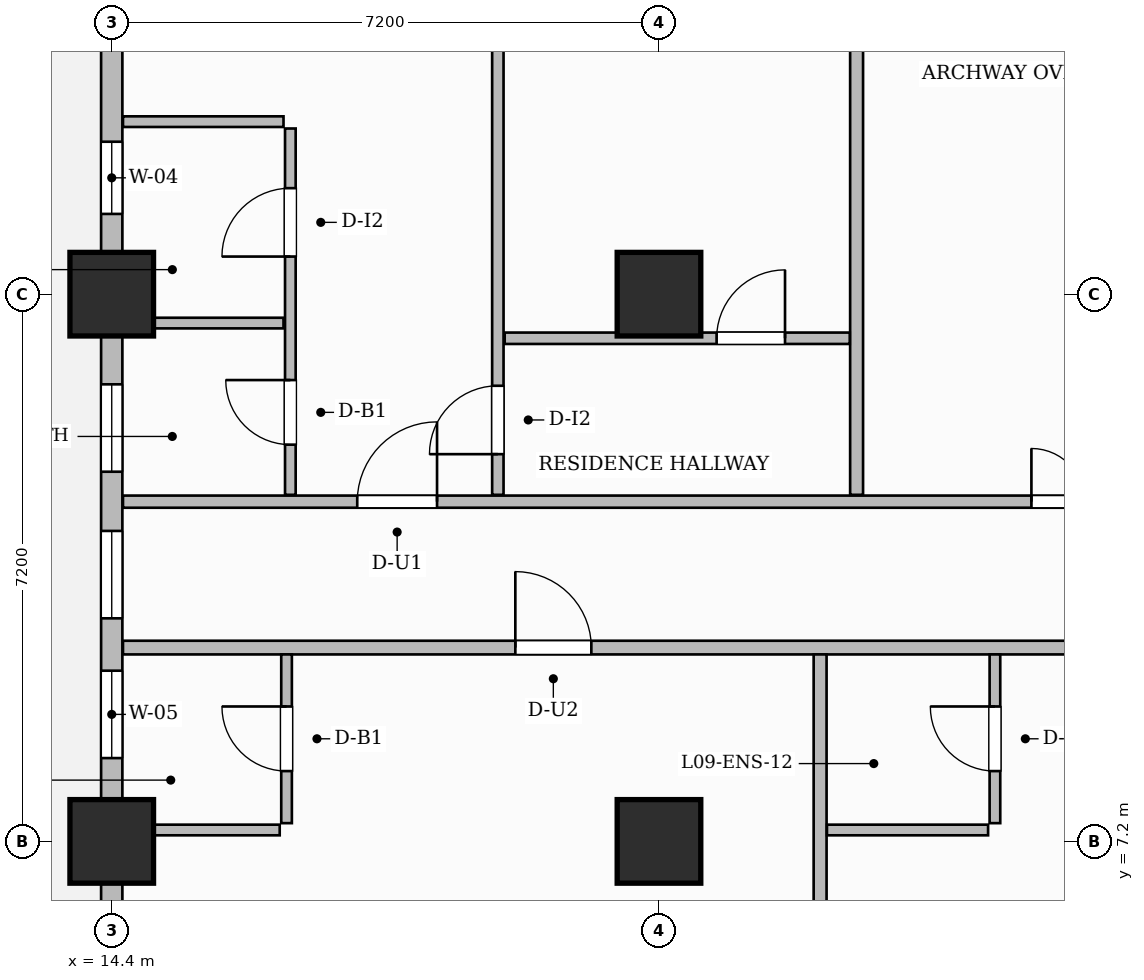
"""IFC4 building model, lengths in metres.
Left out: names, types, materials, properties, quantities, classifications, styles, units other than length and angle.
Written with IfcOpenShell. Run it as: python <this file> out.ifc"""

import sys

from ifc_helpers import new_model, si_unit, direction, frame, frame_2d, origin, origin_2d, place, context, subcontext, project, spatial, rectangle, extrude, source, transform, mapped, element, fill, save


model = new_model("IFC4")
c1 = context("Model", 3, precision=1e-05, world=origin(), true_north=direction((0.0, 1.0)))
c2 = subcontext(c1, "Body", "Model", "MODEL_VIEW")
j1 = project(units=[si_unit("LENGTHUNIT", "METRE"), si_unit("PLANEANGLEUNIT", "RADIAN")], contexts=[c1])
p1 = place(None, origin())
s1 = spatial("IfcSite", under=j1, at=p1, CompositionType="ELEMENT")
p2 = place(p1, origin())
s2 = spatial("IfcBuilding", under=s1, at=p2, CompositionType="ELEMENT")
p3 = place(p2, frame((0.0, 0.0, 43.5)))
s3 = spatial("IfcBuildingStorey", under=s2, at=p3, CompositionType="ELEMENT", Elevation=43.5)
m1 = source(origin(), c2, "Body", "SweptSolid", [
    extrude(rectangle(XDim=1.1, YDim=1.1, at=origin_2d()), origin(), (0.0, 0.0, 1.0), 3.7),
])
for number, where, z_axis, x_axis in (
    (1, (14.4, 7.2, 0.0), (0.0, 0.0, 1.0), (1.0, 0.0, 0.0)),
    (2, (14.4, 14.4, 0.0), (0.0, 0.0, 1.0), (1.0, 0.0, 0.0)),
    (3, (21.6, 7.2, 0.0), (0.0, 0.0, 1.0), (1.0, 0.0, 0.0)),
    (4, (21.6, 14.4, 0.0), (0.0, 0.0, 1.0), (1.0, 0.0, 0.0)),
):
    element("IfcColumn", number, at=place(p3, frame(where, z_axis=z_axis, x_axis=x_axis)), inside=s3, PredefinedType="COLUMN", context=c2, shape_type="MappedRepresentation", body=[
        mapped(m1, transform((0.0, 0.0, 0.0), scale=1.0)),
    ])
p4 = place(p3, frame((14.548, 9.75, 0.0), z_axis=(0.0, 0.0, 1.0), x_axis=(1.0, 0.0, 0.0)))
e5 = element("IfcWall", 5, at=p4, inside=s3, PredefinedType="PARTITIONING", context=c2, shape_type="SweptSolid", body=[
    extrude(rectangle(XDim=15.562, YDim=0.18, at=frame_2d((7.781, 0.0))), origin(), (0.0, 0.0, 1.0), 3.45),
])
p5 = place(p4, frame((5.162, 0.0, 0.0)))
e6 = element("IfcOpeningElement", 6, at=p5, cuts=e5, PredefinedType="OPENING", context=c2, shape_type="SweptSolid", body=[
    extrude(rectangle(XDim=1.0, YDim=2.2, at=frame_2d((0.5, 1.1))), frame((0.0, 0.1, 0.0), z_axis=(0.0, -1.0, 0.0), x_axis=(1.0, 0.0, 0.0)), (0.0, 0.0, 1.0), 0.2),
])
p6 = place(p4, frame((13.037, 0.0, 0.0)))
e7 = element("IfcOpeningElement", 7, at=p6, cuts=e5, PredefinedType="OPENING", context=c2, shape_type="SweptSolid", body=[
    extrude(rectangle(XDim=1.05, YDim=2.25, at=frame_2d((0.525, 1.125))), frame((0.0, 0.1, 0.0), z_axis=(0.0, -1.0, 0.0), x_axis=(1.0, 0.0, 0.0)), (0.0, 0.0, 1.0), 0.2),
])
p7 = place(p3, frame((14.548, 11.67, 0.0), z_axis=(0.0, 0.0, 1.0), x_axis=(1.0, 0.0, 0.0)))
e8 = element("IfcWall", 8, at=p7, inside=s3, PredefinedType="PARTITIONING", context=c2, shape_type="SweptSolid", body=[
    extrude(rectangle(XDim=15.562, YDim=0.16, at=frame_2d((7.781, 0.0))), origin(), (0.0, 0.0, 1.0), 3.45),
])
p8 = place(p7, frame((3.082, 0.0, 0.0)))
e9 = element("IfcOpeningElement", 9, at=p8, cuts=e8, PredefinedType="OPENING", context=c2, shape_type="SweptSolid", body=[
    extrude(rectangle(XDim=1.05, YDim=2.25, at=frame_2d((0.525, 1.125))), frame((0.0, 0.09, 0.0), z_axis=(0.0, -1.0, 0.0), x_axis=(1.0, 0.0, 0.0)), (0.0, 0.0, 1.0), 0.18),
])
p9 = place(p7, frame((11.952, 0.0, 0.0)))
e10 = element("IfcOpeningElement", 10, at=p9, cuts=e8, PredefinedType="OPENING", context=c2, shape_type="SweptSolid", body=[
    extrude(rectangle(XDim=1.4, YDim=2.35, at=frame_2d((0.7, 1.175))), frame((0.0, 0.09, 0.0), z_axis=(0.0, -1.0, 0.0), x_axis=(1.0, 0.0, 0.0)), (0.0, 0.0, 1.0), 0.18),
])
p10 = place(p3, frame((23.72, 0.148, 0.0), z_axis=(0.0, 0.0, 1.0), x_axis=(0.0, 1.0, 0.0)))
e11 = element("IfcWall", 11, at=p10, inside=s3, PredefinedType="PARTITIONING", context=c2, shape_type="SweptSolid", body=[
    extrude(rectangle(XDim=9.512, YDim=0.17, at=frame_2d((4.756, 0.0))), origin(), (0.0, 0.0, 1.0), 3.45),
])
p11 = place(p3, frame((16.7, 7.44, 0.0), z_axis=(0.0, 0.0, 1.0), x_axis=(0.0, 1.0, 0.0)))
e12 = element("IfcWall", 12, at=p11, inside=s3, PredefinedType="PARTITIONING", context=c2, shape_type="SweptSolid", body=[
    extrude(rectangle(XDim=2.22, YDim=0.14, at=frame_2d((1.11, 0.0))), origin(), (0.0, 0.0, 1.0), 3.45),
])
p12 = place(p11, frame((0.685, 0.0, 0.0)))
e13 = element("IfcOpeningElement", 13, at=p12, cuts=e12, PredefinedType="OPENING", context=c2, shape_type="SweptSolid", body=[
    extrude(rectangle(XDim=0.85, YDim=2.1, at=frame_2d((0.425, 1.05))), frame((0.0, 0.08, 0.0), z_axis=(0.0, -1.0, 0.0), x_axis=(1.0, 0.0, 0.0)), (0.0, 0.0, 1.0), 0.16),
])
p13 = place(p3, frame((14.49, 7.35, 0.0), z_axis=(0.0, 0.0, 1.0), x_axis=(1.0, 0.0, 0.0)))
e14 = element("IfcWall", 14, at=p13, inside=s3, PredefinedType="PARTITIONING", context=c2, shape_type="SweptSolid", body=[
    extrude(rectangle(XDim=2.12, YDim=0.14, at=frame_2d((1.06, 0.0))), origin(), (0.0, 0.0, 1.0), 2.885),
])
p14 = place(p3, frame((26.02, 7.44, 0.0), z_axis=(0.0, 0.0, 1.0), x_axis=(0.0, 1.0, 0.0)))
e15 = element("IfcWall", 15, at=p14, inside=s3, PredefinedType="PARTITIONING", context=c2, shape_type="SweptSolid", body=[
    extrude(rectangle(XDim=2.22, YDim=0.14, at=frame_2d((1.11, 0.0))), origin(), (0.0, 0.0, 1.0), 3.45),
])
p15 = place(p14, frame((0.685, 0.0, 0.0)))
e16 = element("IfcOpeningElement", 16, at=p15, cuts=e15, PredefinedType="OPENING", context=c2, shape_type="SweptSolid", body=[
    extrude(rectangle(XDim=0.85, YDim=2.1, at=frame_2d((0.425, 1.05))), frame((0.0, 0.08, 0.0), z_axis=(0.0, -1.0, 0.0), x_axis=(1.0, 0.0, 0.0)), (0.0, 0.0, 1.0), 0.16),
])
p16 = place(p3, frame((23.81, 7.35, 0.0), z_axis=(0.0, 0.0, 1.0), x_axis=(1.0, 0.0, 0.0)))
e17 = element("IfcWall", 17, at=p16, inside=s3, PredefinedType="PARTITIONING", context=c2, shape_type="SweptSolid", body=[
    extrude(rectangle(XDim=2.12, YDim=0.14, at=frame_2d((1.06, 0.0))), origin(), (0.0, 0.0, 1.0), 2.885),
])
p17 = place(p3, frame((24.2, 11.76, 0.0), z_axis=(0.0, 0.0, 1.0), x_axis=(0.0, 1.0, 0.0)))
e18 = element("IfcWall", 18, at=p17, inside=s3, PredefinedType="PARTITIONING", context=c2, shape_type="SweptSolid", body=[
    extrude(rectangle(XDim=9.692, YDim=0.17, at=frame_2d((4.846, 0.0))), origin(), (0.0, 0.0, 1.0), 3.45),
])
p18 = place(p3, frame((16.75, 11.76, 0.0), z_axis=(0.0, 0.0, 1.0), x_axis=(0.0, 1.0, 0.0)))
e19 = element("IfcWall", 19, at=p18, inside=s3, PredefinedType="PARTITIONING", context=c2, shape_type="SweptSolid", body=[
    extrude(rectangle(XDim=4.82, YDim=0.14, at=frame_2d((2.41, 0.0))), origin(), (0.0, 0.0, 1.0), 3.45),
])
p19 = place(p18, frame((0.66, 0.0, 0.0)))
e20 = element("IfcOpeningElement", 20, at=p19, cuts=e19, PredefinedType="OPENING", context=c2, shape_type="SweptSolid", body=[
    extrude(rectangle(XDim=0.85, YDim=2.1, at=frame_2d((0.425, 1.05))), frame((0.0, 0.08, 0.0), z_axis=(0.0, -1.0, 0.0), x_axis=(1.0, 0.0, 0.0)), (0.0, 0.0, 1.0), 0.16),
])
p20 = place(p18, frame((3.135, 0.0, 0.0)))
e21 = element("IfcOpeningElement", 21, at=p20, cuts=e19, PredefinedType="OPENING", context=c2, shape_type="SweptSolid", body=[
    extrude(rectangle(XDim=0.9, YDim=2.15, at=frame_2d((0.45, 1.075))), frame((0.0, 0.08, 0.0), z_axis=(0.0, -1.0, 0.0), x_axis=(1.0, 0.0, 0.0)), (0.0, 0.0, 1.0), 0.16),
])
p21 = place(p3, frame((14.59, 14.02, 0.0), z_axis=(0.0, 0.0, 1.0), x_axis=(1.0, 0.0, 0.0)))
e22 = element("IfcWall", 22, at=p21, inside=s3, PredefinedType="PARTITIONING", context=c2, shape_type="SweptSolid", body=[
    extrude(rectangle(XDim=2.07, YDim=0.14, at=frame_2d((1.035, 0.0))), origin(), (0.0, 0.0, 1.0), 3.45),
])
p22 = place(p3, frame((14.548, 16.67, 0.0), z_axis=(0.0, 0.0, 1.0), x_axis=(1.0, 0.0, 0.0)))
e23 = element("IfcWall", 23, at=p22, inside=s3, PredefinedType="PARTITIONING", context=c2, shape_type="SweptSolid", body=[
    extrude(rectangle(XDim=2.112, YDim=0.14, at=frame_2d((1.056, 0.0))), origin(), (0.0, 0.0, 1.0), 3.45),
])
p23 = place(p3, frame((19.48, 11.76, 0.0), z_axis=(0.0, 0.0, 1.0), x_axis=(0.0, 1.0, 0.0)))
e24 = element("IfcWall", 24, at=p23, inside=s3, PredefinedType="PARTITIONING", context=c2, shape_type="SweptSolid", body=[
    extrude(rectangle(XDim=9.692, YDim=0.15, at=frame_2d((4.846, 0.0))), origin(), (0.0, 0.0, 1.0), 3.45),
])
p24 = place(p23, frame((0.535, 0.0, 0.0)))
e25 = element("IfcOpeningElement", 25, at=p24, cuts=e24, PredefinedType="OPENING", context=c2, shape_type="SweptSolid", body=[
    extrude(rectangle(XDim=0.9, YDim=2.15, at=frame_2d((0.45, 1.075))), frame((0.0, 0.085, 0.0), z_axis=(0.0, -1.0, 0.0), x_axis=(1.0, 0.0, 0.0)), (0.0, 0.0, 1.0), 0.17),
])
p25 = place(p3, frame((19.57, 13.82, 0.0), z_axis=(0.0, 0.0, 1.0), x_axis=(1.0, 0.0, 0.0)))
e26 = element("IfcWall", 26, at=p25, inside=s3, PredefinedType="PARTITIONING", context=c2, shape_type="SweptSolid", body=[
    extrude(rectangle(XDim=4.54, YDim=0.15, at=frame_2d((2.27, 0.0))), origin(), (0.0, 0.0, 1.0), 3.45),
])
p26 = place(p25, frame((2.788, 0.0, 0.0)))
e27 = element("IfcOpeningElement", 27, at=p26, cuts=e26, PredefinedType="OPENING", context=c2, shape_type="SweptSolid", body=[
    extrude(rectangle(XDim=0.9, YDim=2.15, at=frame_2d((0.45, 1.075))), frame((0.0, 0.085, 0.0), z_axis=(0.0, -1.0, 0.0), x_axis=(1.0, 0.0, 0.0)), (0.0, 0.0, 1.0), 0.17),
])
p27 = place(p3, frame((14.4, 0.05, 0.0), z_axis=(0.0, 0.0, 1.0), x_axis=(0.0, 1.0, 0.0)))
e28 = element("IfcWall", 28, at=p27, inside=s3, PredefinedType="SOLIDWALL", context=c2, shape_type="SweptSolid", body=[
    extrude(rectangle(XDim=21.5, YDim=0.28, at=frame_2d((10.75, 0.0))), origin(), (0.0, 0.0, 1.0), 2.885),
])
p28 = place(p27, frame((1.275, 0.0, 0.8)))
e29 = element("IfcOpeningElement", 29, at=p28, cuts=e28, PredefinedType="OPENING", context=c2, shape_type="SweptSolid", body=[
    extrude(rectangle(XDim=1.8, YDim=1.85, at=frame_2d((0.9, 0.925))), frame((0.0, 0.15, 0.0), z_axis=(0.0, -1.0, 0.0), x_axis=(1.0, 0.0, 0.0)), (0.0, 0.0, 1.0), 0.3),
])
p29 = place(p27, frame((4.025, 0.0, 0.8)))
e30 = element("IfcOpeningElement", 30, at=p29, cuts=e28, PredefinedType="OPENING", context=c2, shape_type="SweptSolid", body=[
    extrude(rectangle(XDim=1.8, YDim=1.85, at=frame_2d((0.9, 0.925))), frame((0.0, 0.15, 0.0), z_axis=(0.0, -1.0, 0.0), x_axis=(1.0, 0.0, 0.0)), (0.0, 0.0, 1.0), 0.3),
])
p30 = place(p27, frame((8.246, 0.0, 0.8)))
e31 = element("IfcOpeningElement", 31, at=p30, cuts=e28, PredefinedType="OPENING", context=c2, shape_type="SweptSolid", body=[
    extrude(rectangle(XDim=1.15, YDim=1.8, at=frame_2d((0.575, 0.9))), frame((0.0, 0.15, 0.0), z_axis=(0.0, -1.0, 0.0), x_axis=(1.0, 0.0, 0.0)), (0.0, 0.0, 1.0), 0.3),
])
p31 = place(p27, frame((10.085, 0.0, 0.8)))
e32 = element("IfcOpeningElement", 32, at=p31, cuts=e28, PredefinedType="OPENING", context=c2, shape_type="SweptSolid", body=[
    extrude(rectangle(XDim=1.15, YDim=1.8, at=frame_2d((0.575, 0.9))), frame((0.0, 0.15, 0.0), z_axis=(0.0, -1.0, 0.0), x_axis=(1.0, 0.0, 0.0)), (0.0, 0.0, 1.0), 0.3),
])
p32 = place(p27, frame((12.014, 0.0, 0.8)))
e33 = element("IfcOpeningElement", 33, at=p32, cuts=e28, PredefinedType="OPENING", context=c2, shape_type="SweptSolid", body=[
    extrude(rectangle(XDim=1.15, YDim=1.8, at=frame_2d((0.575, 0.9))), frame((0.0, 0.15, 0.0), z_axis=(0.0, -1.0, 0.0), x_axis=(1.0, 0.0, 0.0)), (0.0, 0.0, 1.0), 0.3),
])
p33 = place(p27, frame((15.406, 0.0, 0.8)))
e34 = element("IfcOpeningElement", 34, at=p33, cuts=e28, PredefinedType="OPENING", context=c2, shape_type="SweptSolid", body=[
    extrude(rectangle(XDim=0.95, YDim=1.75, at=frame_2d((0.475, 0.875))), frame((0.0, 0.15, 0.0), z_axis=(0.0, -1.0, 0.0), x_axis=(1.0, 0.0, 0.0)), (0.0, 0.0, 1.0), 0.3),
])
p34 = place(p27, frame((17.789, 0.0, 0.8)))
e35 = element("IfcOpeningElement", 35, at=p34, cuts=e28, PredefinedType="OPENING", context=c2, shape_type="SweptSolid", body=[
    extrude(rectangle(XDim=1.8, YDim=1.85, at=frame_2d((0.9, 0.925))), frame((0.0, 0.15, 0.0), z_axis=(0.0, -1.0, 0.0), x_axis=(1.0, 0.0, 0.0)), (0.0, 0.0, 1.0), 0.3),
])
m2 = source(origin(), c2, "Body", "SweptSolid", [
    extrude(rectangle(XDim=0.85, YDim=2.1, at=frame_2d((0.425, 1.05))), frame((0.0, 0.025, 0.0), z_axis=(0.0, -1.0, 0.0), x_axis=(1.0, 0.0, 0.0)), (0.0, 0.0, 1.0), 0.05),
])
p35 = place(p12, origin())
e36 = element("IfcDoor", 36, at=p35, inside=s3, OperationType="SINGLE_SWING_RIGHT", PredefinedType="DOOR", context=c2, shape_type="MappedRepresentation", body=[
    mapped(m2, transform((0.0, 0.0, 0.0), scale=1.0)),
])
fill(e13, e36)
m3 = source(origin(), c2, "Body", "SweptSolid", [
    extrude(rectangle(XDim=1.0, YDim=2.2, at=frame_2d((0.5, 1.1))), frame((0.0, 0.025, 0.0), z_axis=(0.0, -1.0, 0.0), x_axis=(1.0, 0.0, 0.0)), (0.0, 0.0, 1.0), 0.05),
])
p36 = place(p5, origin())
e37 = element("IfcDoor", 37, at=p36, inside=s3, OperationType="SINGLE_SWING_LEFT", PredefinedType="DOOR", context=c2, shape_type="MappedRepresentation", body=[
    mapped(m3, transform((0.0, 0.0, 0.0), scale=1.0)),
])
fill(e6, e37)
p37 = place(p15, origin())
e38 = element("IfcDoor", 38, at=p37, inside=s3, OperationType="SINGLE_SWING_RIGHT", PredefinedType="DOOR", context=c2, shape_type="MappedRepresentation", body=[
    mapped(m2, transform((0.0, 0.0, 0.0), scale=1.0)),
])
fill(e16, e38)
p38 = place(p19, origin())
e39 = element("IfcDoor", 39, at=p38, inside=s3, OperationType="SINGLE_SWING_RIGHT", PredefinedType="DOOR", context=c2, shape_type="MappedRepresentation", body=[
    mapped(m2, transform((0.0, 0.0, 0.0), scale=1.0)),
])
fill(e20, e39)
m4 = source(origin(), c2, "Body", "SweptSolid", [
    extrude(rectangle(XDim=0.9, YDim=2.15, at=frame_2d((0.45, 1.075))), frame((0.0, 0.025, 0.0), z_axis=(0.0, -1.0, 0.0), x_axis=(1.0, 0.0, 0.0)), (0.0, 0.0, 1.0), 0.05),
])
p39 = place(p20, origin())
e40 = element("IfcDoor", 40, at=p39, inside=s3, OperationType="SINGLE_SWING_LEFT", PredefinedType="DOOR", context=c2, shape_type="MappedRepresentation", body=[
    mapped(m4, transform((0.0, 0.0, 0.0), scale=1.0)),
])
fill(e21, e40)
m5 = source(origin(), c2, "Body", "SweptSolid", [
    extrude(rectangle(XDim=1.05, YDim=2.25, at=frame_2d((0.525, 1.125))), frame((0.0, 0.025, 0.0), z_axis=(0.0, -1.0, 0.0), x_axis=(1.0, 0.0, 0.0)), (0.0, 0.0, 1.0), 0.05),
])
p40 = place(p8, origin())
e41 = element("IfcDoor", 41, at=p40, inside=s3, OperationType="SINGLE_SWING_RIGHT", PredefinedType="DOOR", context=c2, shape_type="MappedRepresentation", body=[
    mapped(m5, transform((0.0, 0.0, 0.0), scale=1.0)),
])
fill(e9, e41)
p41 = place(p24, origin())
e42 = element("IfcDoor", 42, at=p41, inside=s3, OperationType="SINGLE_SWING_LEFT", PredefinedType="DOOR", context=c2, shape_type="MappedRepresentation", body=[
    mapped(m4, transform((0.0, 0.0, 0.0), scale=1.0)),
])
fill(e25, e42)
p42 = place(p26, origin())
e43 = element("IfcDoor", 43, at=p42, inside=s3, OperationType="SINGLE_SWING_RIGHT", PredefinedType="DOOR", context=c2, shape_type="MappedRepresentation", body=[
    mapped(m4, transform((0.0, 0.0, 0.0), scale=1.0)),
])
fill(e27, e43)
m6 = source(origin(), c2, "Body", "SweptSolid", [
    extrude(rectangle(XDim=1.4, YDim=2.35, at=frame_2d((0.7, 1.175))), frame((0.0, 0.025, 0.0), z_axis=(0.0, -1.0, 0.0), x_axis=(1.0, 0.0, 0.0)), (0.0, 0.0, 1.0), 0.05),
])
p43 = place(p9, origin())
e44 = element("IfcDoor", 44, at=p43, inside=s3, OperationType="DOUBLE_DOOR_SINGLE_SWING", PredefinedType="DOOR", context=c2, shape_type="MappedRepresentation", body=[
    mapped(m6, transform((0.0, 0.0, 0.0), scale=1.0)),
])
fill(e10, e44)
m7 = source(origin(), c2, "Body", "SweptSolid", [
    extrude(rectangle(XDim=1.15, YDim=1.8, at=frame_2d((0.575, 0.9))), frame((0.0, 0.03, 0.0), z_axis=(0.0, -1.0, 0.0), x_axis=(1.0, 0.0, 0.0)), (0.0, 0.0, 1.0), 0.06),
])
p44 = place(p30, origin())
e45 = element("IfcWindow", 45, at=p44, inside=s3, PartitioningType="SINGLE_PANEL", PredefinedType="WINDOW", context=c2, shape_type="MappedRepresentation", body=[
    mapped(m7, transform((0.0, 0.0, 0.0), scale=1.0)),
])
fill(e31, e45)
p45 = place(p31, origin())
e46 = element("IfcWindow", 46, at=p45, inside=s3, PartitioningType="SINGLE_PANEL", PredefinedType="WINDOW", context=c2, shape_type="MappedRepresentation", body=[
    mapped(m7, transform((0.0, 0.0, 0.0), scale=1.0)),
])
fill(e32, e46)
p46 = place(p32, origin())
e47 = element("IfcWindow", 47, at=p46, inside=s3, PartitioningType="SINGLE_PANEL", PredefinedType="WINDOW", context=c2, shape_type="MappedRepresentation", body=[
    mapped(m7, transform((0.0, 0.0, 0.0), scale=1.0)),
])
fill(e33, e47)
m8 = source(origin(), c2, "Body", "SweptSolid", [
    extrude(rectangle(XDim=0.95, YDim=1.75, at=frame_2d((0.475, 0.875))), frame((0.0, 0.03, 0.0), z_axis=(0.0, -1.0, 0.0), x_axis=(1.0, 0.0, 0.0)), (0.0, 0.0, 1.0), 0.06),
])
p47 = place(p33, origin())
e48 = element("IfcWindow", 48, at=p47, inside=s3, PartitioningType="SINGLE_PANEL", PredefinedType="WINDOW", context=c2, shape_type="MappedRepresentation", body=[
    mapped(m8, transform((0.0, 0.0, 0.0), scale=1.0)),
])
fill(e34, e48)
save(model, sys.argv[1])
